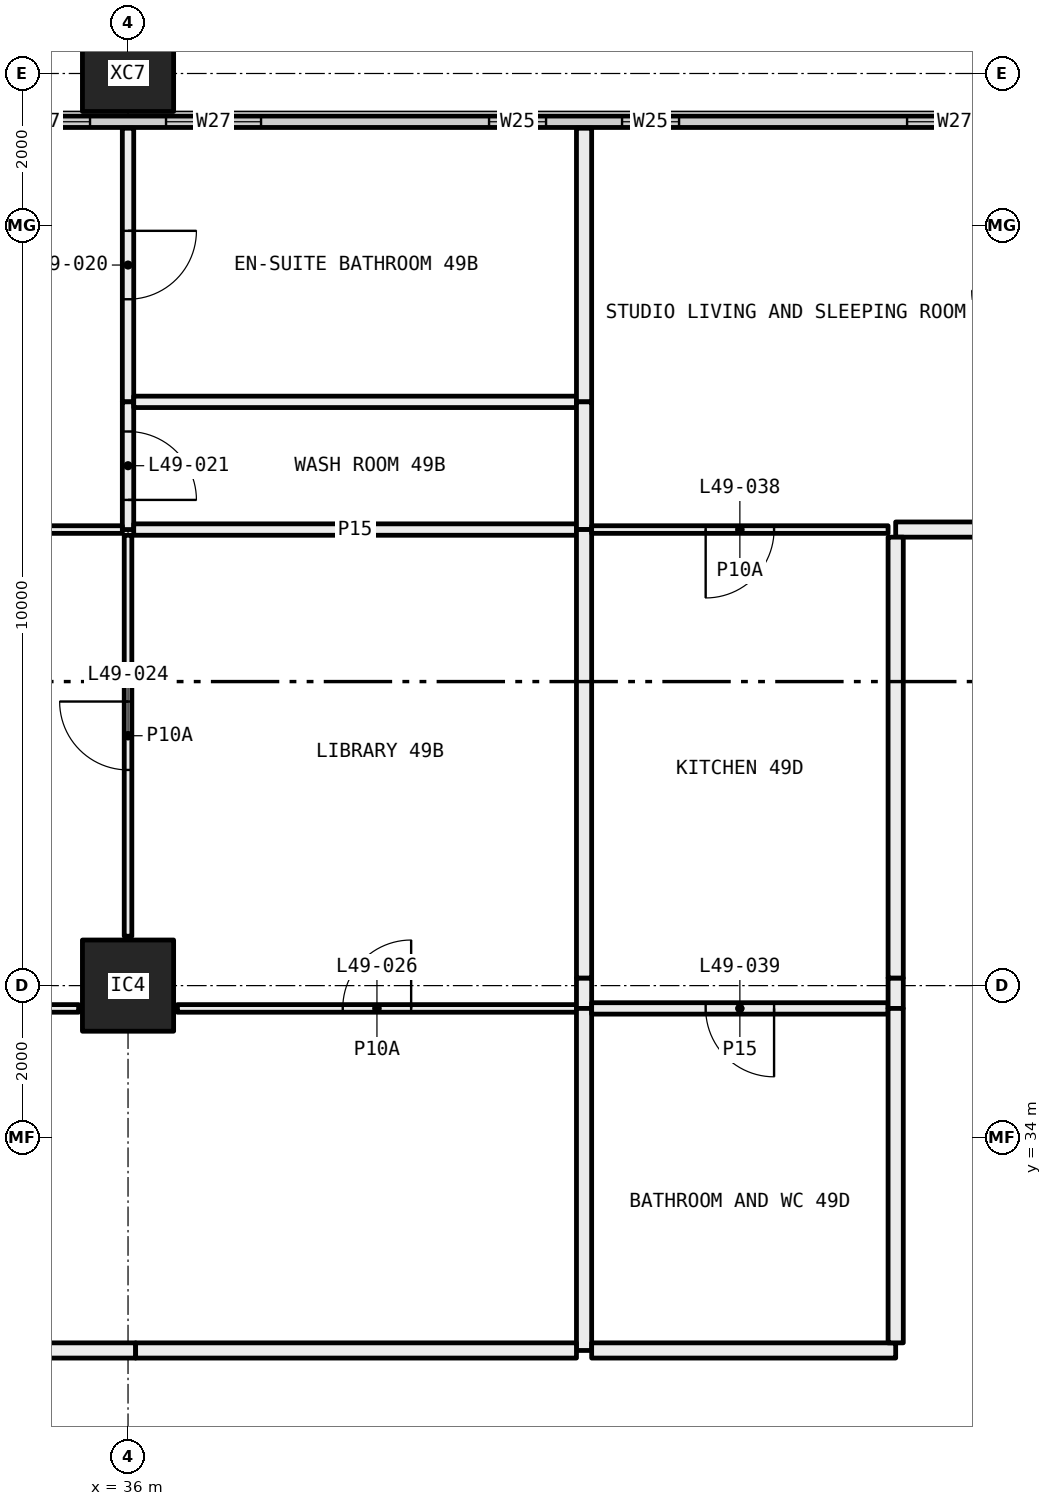
"""IFC4 building model, lengths in metres.
Left out: names, types, materials, properties, quantities, classifications, styles, units other than length and angle.
Written with IfcOpenShell. Run it as: python <this file> out.ifc"""

import sys

from ifc_helpers import new_model, si_unit, direction, frame, frame_2d, origin, origin_2d, place, context, subcontext, project, spatial, rectangle, hollow_rectangle, extrude, element, fill, save


model = new_model("IFC4")
c1 = context("Model", 3, precision=1e-05, world=origin(), true_north=direction((0.0, 1.0)))
c2 = subcontext(c1, "Body", "Model", "MODEL_VIEW")
j1 = project(units=[si_unit("LENGTHUNIT", "METRE"), si_unit("PLANEANGLEUNIT", "RADIAN")], contexts=[c1])
p1 = place(None, origin())
s1 = spatial("IfcSite", under=j1, at=p1, CompositionType="ELEMENT")
p2 = place(p1, origin())
s2 = spatial("IfcBuilding", under=s1, at=p2, CompositionType="ELEMENT")
p3 = place(p2, frame((0.0, 0.0, 185.85)))
s3 = spatial("IfcBuildingStorey", under=s2, at=p3, CompositionType="ELEMENT", Elevation=185.85)
p4 = place(p3, frame((36.0, 36.0, 0.0), z_axis=(0.0, 0.0, 1.0), x_axis=(1.0, 0.0, 0.0)))
e1 = element("IfcColumn", 1, at=p4, inside=s3, PredefinedType="COLUMN", context=c2, shape_type="SweptSolid", body=[
    extrude(hollow_rectangle(XDim=1.2, YDim=1.2, WallThickness=0.05, at=origin_2d()), origin(), (0.0, 0.0, 1.0), 3.05),
])
p5 = place(p3, frame((36.0, 48.0, -0.4), z_axis=(0.0, 0.0, 1.0), x_axis=(1.0, 0.0, 0.0)))
e2 = element("IfcColumn", 2, at=p5, inside=s3, PredefinedType="COLUMN", context=c2, shape_type="SweptSolid", body=[
    extrude(hollow_rectangle(XDim=1.2, YDim=1.0, WallThickness=0.045, at=origin_2d()), origin(), (0.0, 0.0, 1.0), 3.45),
])
p6 = place(p3, frame((6.56, 47.365, 0.0), z_axis=(0.0, 0.0, 1.0), x_axis=(1.0, 0.0, 0.0)))
e3 = element("IfcWall", 3, at=p6, inside=s3, PredefinedType="ELEMENTEDWALL", context=c2, shape_type="SweptSolid", body=[
    extrude(rectangle(XDim=46.88, YDim=0.15, at=frame_2d((23.44, 0.0))), origin(), (0.0, 0.0, 1.0), 3.05),
])
p7 = place(p6, frame((0.44, 0.0, 0.45)))
e4 = element("IfcOpeningElement", 4, at=p7, cuts=e3, PredefinedType="OPENING", context=c2, shape_type="SweptSolid", body=[
    extrude(rectangle(XDim=4.5, YDim=2.55, at=frame_2d((2.25, 1.275))), frame((0.0, 0.085, 0.0), z_axis=(0.0, -1.0, 0.0), x_axis=(1.0, 0.0, 0.0)), (0.0, 0.0, 1.0), 0.17),
])
p8 = place(p6, frame((5.94, 0.0, 0.45)))
e5 = element("IfcOpeningElement", 5, at=p8, cuts=e3, PredefinedType="OPENING", context=c2, shape_type="SweptSolid", body=[
    extrude(rectangle(XDim=1.25, YDim=2.55, at=frame_2d((0.625, 1.275))), frame((0.0, 0.085, 0.0), z_axis=(0.0, -1.0, 0.0), x_axis=(1.0, 0.0, 0.0)), (0.0, 0.0, 1.0), 0.17),
])
p9 = place(p6, frame((10.19, 0.0, 0.45)))
e6 = element("IfcOpeningElement", 6, at=p9, cuts=e3, PredefinedType="OPENING", context=c2, shape_type="SweptSolid", body=[
    extrude(rectangle(XDim=0.75, YDim=2.55, at=frame_2d((0.375, 1.275))), frame((0.0, 0.085, 0.0), z_axis=(0.0, -1.0, 0.0), x_axis=(1.0, 0.0, 0.0)), (0.0, 0.0, 1.0), 0.17),
])
p10 = place(p6, frame((11.94, 0.0, 0.45)))
e7 = element("IfcOpeningElement", 7, at=p10, cuts=e3, PredefinedType="OPENING", context=c2, shape_type="SweptSolid", body=[
    extrude(rectangle(XDim=0.75, YDim=2.55, at=frame_2d((0.375, 1.275))), frame((0.0, 0.085, 0.0), z_axis=(0.0, -1.0, 0.0), x_axis=(1.0, 0.0, 0.0)), (0.0, 0.0, 1.0), 0.17),
])
p11 = place(p6, frame((15.69, 0.0, 0.45)))
e8 = element("IfcOpeningElement", 8, at=p11, cuts=e3, PredefinedType="OPENING", context=c2, shape_type="SweptSolid", body=[
    extrude(rectangle(XDim=1.25, YDim=2.55, at=frame_2d((0.625, 1.275))), frame((0.0, 0.085, 0.0), z_axis=(0.0, -1.0, 0.0), x_axis=(1.0, 0.0, 0.0)), (0.0, 0.0, 1.0), 0.17),
])
p12 = place(p6, frame((17.94, 0.0, 0.45)))
e9 = element("IfcOpeningElement", 9, at=p12, cuts=e3, PredefinedType="OPENING", context=c2, shape_type="SweptSolid", body=[
    extrude(rectangle(XDim=1.25, YDim=2.55, at=frame_2d((0.625, 1.275))), frame((0.0, 0.085, 0.0), z_axis=(0.0, -1.0, 0.0), x_axis=(1.0, 0.0, 0.0)), (0.0, 0.0, 1.0), 0.17),
])
p13 = place(p6, frame((22.19, 0.0, 0.45)))
e10 = element("IfcOpeningElement", 10, at=p13, cuts=e3, PredefinedType="OPENING", context=c2, shape_type="SweptSolid", body=[
    extrude(rectangle(XDim=0.75, YDim=2.55, at=frame_2d((0.375, 1.275))), frame((0.0, 0.085, 0.0), z_axis=(0.0, -1.0, 0.0), x_axis=(1.0, 0.0, 0.0)), (0.0, 0.0, 1.0), 0.17),
])
p14 = place(p6, frame((23.94, 0.0, 0.45)))
e11 = element("IfcOpeningElement", 11, at=p14, cuts=e3, PredefinedType="OPENING", context=c2, shape_type="SweptSolid", body=[
    extrude(rectangle(XDim=0.75, YDim=2.55, at=frame_2d((0.375, 1.275))), frame((0.0, 0.085, 0.0), z_axis=(0.0, -1.0, 0.0), x_axis=(1.0, 0.0, 0.0)), (0.0, 0.0, 1.0), 0.17),
])
p15 = place(p6, frame((27.69, 0.0, 0.45)))
e12 = element("IfcOpeningElement", 12, at=p15, cuts=e3, PredefinedType="OPENING", context=c2, shape_type="SweptSolid", body=[
    extrude(rectangle(XDim=1.25, YDim=2.55, at=frame_2d((0.625, 1.275))), frame((0.0, 0.085, 0.0), z_axis=(0.0, -1.0, 0.0), x_axis=(1.0, 0.0, 0.0)), (0.0, 0.0, 1.0), 0.17),
])
p16 = place(p6, frame((29.94, 0.0, 0.45)))
e13 = element("IfcOpeningElement", 13, at=p16, cuts=e3, PredefinedType="OPENING", context=c2, shape_type="SweptSolid", body=[
    extrude(rectangle(XDim=1.25, YDim=2.55, at=frame_2d((0.625, 1.275))), frame((0.0, 0.085, 0.0), z_axis=(0.0, -1.0, 0.0), x_axis=(1.0, 0.0, 0.0)), (0.0, 0.0, 1.0), 0.17),
])
p17 = place(p6, frame((34.19, 0.0, 0.45)))
e14 = element("IfcOpeningElement", 14, at=p17, cuts=e3, PredefinedType="OPENING", context=c2, shape_type="SweptSolid", body=[
    extrude(rectangle(XDim=0.75, YDim=2.55, at=frame_2d((0.375, 1.275))), frame((0.0, 0.085, 0.0), z_axis=(0.0, -1.0, 0.0), x_axis=(1.0, 0.0, 0.0)), (0.0, 0.0, 1.0), 0.17),
])
p18 = place(p6, frame((35.94, 0.0, 0.45)))
e15 = element("IfcOpeningElement", 15, at=p18, cuts=e3, PredefinedType="OPENING", context=c2, shape_type="SweptSolid", body=[
    extrude(rectangle(XDim=0.75, YDim=2.55, at=frame_2d((0.375, 1.275))), frame((0.0, 0.085, 0.0), z_axis=(0.0, -1.0, 0.0), x_axis=(1.0, 0.0, 0.0)), (0.0, 0.0, 1.0), 0.17),
])
p19 = place(p6, frame((39.69, 0.0, 0.45)))
e16 = element("IfcOpeningElement", 16, at=p19, cuts=e3, PredefinedType="OPENING", context=c2, shape_type="SweptSolid", body=[
    extrude(rectangle(XDim=1.25, YDim=2.55, at=frame_2d((0.625, 1.275))), frame((0.0, 0.085, 0.0), z_axis=(0.0, -1.0, 0.0), x_axis=(1.0, 0.0, 0.0)), (0.0, 0.0, 1.0), 0.17),
])
p20 = place(p6, frame((41.94, 0.0, 0.45)))
e17 = element("IfcOpeningElement", 17, at=p20, cuts=e3, PredefinedType="OPENING", context=c2, shape_type="SweptSolid", body=[
    extrude(rectangle(XDim=4.5, YDim=2.55, at=frame_2d((2.25, 1.275))), frame((0.0, 0.085, 0.0), z_axis=(0.0, -1.0, 0.0), x_axis=(1.0, 0.0, 0.0)), (0.0, 0.0, 1.0), 0.17),
])
p21 = place(p3, frame((36.0, 43.68, 0.0), z_axis=(0.0, 0.0, 1.0), x_axis=(0.0, 1.0, 0.0)))
e18 = element("IfcWall", 18, at=p21, inside=s3, PredefinedType="PARTITIONING", context=c2, shape_type="SweptSolid", body=[
    extrude(rectangle(XDim=3.6, YDim=0.15, at=frame_2d((1.8, 0.0))), origin(), (0.0, 0.0, 1.0), 2.45),
])
p22 = place(p21, frame((1.35, 0.0, 0.0)))
e19 = element("IfcOpeningElement", 19, at=p22, cuts=e18, PredefinedType="OPENING", context=c2, shape_type="SweptSolid", body=[
    extrude(rectangle(XDim=0.9, YDim=2.1, at=frame_2d((0.45, 1.05))), frame((0.0, 0.085, 0.0), z_axis=(0.0, -1.0, 0.0), x_axis=(1.0, 0.0, 0.0)), (0.0, 0.0, 1.0), 0.17),
])
p23 = place(p3, frame((36.0, 42.0, 0.0), z_axis=(0.0, 0.0, 1.0), x_axis=(0.0, 1.0, 0.0)))
e20 = element("IfcWall", 20, at=p23, inside=s3, PredefinedType="PARTITIONING", context=c2, shape_type="SweptSolid", body=[
    extrude(rectangle(XDim=1.68, YDim=0.15, at=frame_2d((0.84, 0.0))), origin(), (0.0, 0.0, 1.0), 2.45),
])
p24 = place(p23, frame((0.39, 0.0, 0.0)))
e21 = element("IfcOpeningElement", 21, at=p24, cuts=e20, PredefinedType="OPENING", context=c2, shape_type="SweptSolid", body=[
    extrude(rectangle(XDim=0.9, YDim=2.1, at=frame_2d((0.45, 1.05))), frame((0.0, 0.085, 0.0), z_axis=(0.0, -1.0, 0.0), x_axis=(1.0, 0.0, 0.0)), (0.0, 0.0, 1.0), 0.17),
])
p25 = place(p3, frame((31.5, 42.0, 0.0), z_axis=(0.0, 0.0, 1.0), x_axis=(1.0, 0.0, 0.0)))
e22 = element("IfcWall", 22, at=p25, inside=s3, PredefinedType="PARTITIONING", context=c2, shape_type="SweptSolid", body=[
    extrude(rectangle(XDim=4.425, YDim=0.1, at=frame_2d((2.212, 0.0))), origin(), (0.0, 0.0, 1.0), 2.45),
])
p26 = place(p3, frame((36.075, 43.68, 0.0), z_axis=(0.0, 0.0, 1.0), x_axis=(1.0, 0.0, 0.0)))
e23 = element("IfcWall", 23, at=p26, inside=s3, PredefinedType="PARTITIONING", context=c2, shape_type="SweptSolid", body=[
    extrude(rectangle(XDim=5.825, YDim=0.15, at=frame_2d((2.913, 0.0))), origin(), (0.0, 0.0, 1.0), 2.45),
])
p27 = place(p3, frame((42.0, 43.68, 0.0), z_axis=(0.0, 0.0, 1.0), x_axis=(0.0, 1.0, 0.0)))
e24 = element("IfcWall", 24, at=p27, inside=s3, PredefinedType="PARTITIONING", context=c2, shape_type="SweptSolid", body=[
    extrude(rectangle(XDim=3.6, YDim=0.2, at=frame_2d((1.8, 0.0))), origin(), (0.0, 0.0, 1.0), 3.05),
])
p28 = place(p3, frame((36.075, 42.0, 0.0), z_axis=(0.0, 0.0, 1.0), x_axis=(1.0, 0.0, 0.0)))
e25 = element("IfcWall", 25, at=p28, inside=s3, PredefinedType="PARTITIONING", context=c2, shape_type="SweptSolid", body=[
    extrude(rectangle(XDim=5.825, YDim=0.15, at=frame_2d((2.913, 0.0))), origin(), (0.0, 0.0, 1.0), 2.45),
])
p29 = place(p3, frame((42.0, 42.0, 0.0), z_axis=(0.0, 0.0, 1.0), x_axis=(0.0, 1.0, 0.0)))
e26 = element("IfcWall", 26, at=p29, inside=s3, PredefinedType="PARTITIONING", context=c2, shape_type="SweptSolid", body=[
    extrude(rectangle(XDim=1.68, YDim=0.2, at=frame_2d((0.84, 0.0))), origin(), (0.0, 0.0, 1.0), 3.05),
])
p30 = place(p3, frame((36.0, 36.65, 0.0), z_axis=(0.0, 0.0, 1.0), x_axis=(0.0, 1.0, 0.0)))
e27 = element("IfcWall", 27, at=p30, inside=s3, PredefinedType="PARTITIONING", context=c2, shape_type="SweptSolid", body=[
    extrude(rectangle(XDim=5.275, YDim=0.1, at=frame_2d((2.638, 0.0))), origin(), (0.0, 0.0, 1.0), 2.45),
])
p31 = place(p30, frame((2.188, 0.0, 0.0)))
e28 = element("IfcOpeningElement", 28, at=p31, cuts=e27, PredefinedType="OPENING", context=c2, shape_type="SweptSolid", body=[
    extrude(rectangle(XDim=0.9, YDim=2.1, at=frame_2d((0.45, 1.05))), frame((0.0, 0.06, 0.0), z_axis=(0.0, -1.0, 0.0), x_axis=(1.0, 0.0, 0.0)), (0.0, 0.0, 1.0), 0.12),
])
p32 = place(p3, frame((31.55, 35.7, 0.0), z_axis=(0.0, 0.0, 1.0), x_axis=(1.0, 0.0, 0.0)))
e29 = element("IfcWall", 29, at=p32, inside=s3, PredefinedType="PARTITIONING", context=c2, shape_type="SweptSolid", body=[
    extrude(rectangle(XDim=3.8, YDim=0.1, at=frame_2d((1.9, 0.0))), origin(), (0.0, 0.0, 1.0), 3.05),
])
p33 = place(p3, frame((36.65, 35.7, 0.0), z_axis=(0.0, 0.0, 1.0), x_axis=(1.0, 0.0, 0.0)))
e30 = element("IfcWall", 30, at=p33, inside=s3, PredefinedType="PARTITIONING", context=c2, shape_type="SweptSolid", body=[
    extrude(rectangle(XDim=5.25, YDim=0.1, at=frame_2d((2.625, 0.0))), origin(), (0.0, 0.0, 1.0), 3.05),
])
p34 = place(p33, frame((2.175, 0.0, 0.0)))
e31 = element("IfcOpeningElement", 31, at=p34, cuts=e30, PredefinedType="OPENING", context=c2, shape_type="SweptSolid", body=[
    extrude(rectangle(XDim=0.9, YDim=2.1, at=frame_2d((0.45, 1.05))), frame((0.0, 0.06, 0.0), z_axis=(0.0, -1.0, 0.0), x_axis=(1.0, 0.0, 0.0)), (0.0, 0.0, 1.0), 0.12),
])
p35 = place(p3, frame((42.0, 35.7, 0.0), z_axis=(0.0, 0.0, 1.0), x_axis=(0.0, 1.0, 0.0)))
e32 = element("IfcWall", 32, at=p35, inside=s3, PredefinedType="PARTITIONING", context=c2, shape_type="SweptSolid", body=[
    extrude(rectangle(XDim=0.4, YDim=0.2, at=frame_2d((0.2, 0.0))), origin(), (0.0, 0.0, 1.0), 2.45),
])
p36 = place(p3, frame((42.0, 36.1, 0.0), z_axis=(0.0, 0.0, 1.0), x_axis=(0.0, 1.0, 0.0)))
e33 = element("IfcWall", 33, at=p36, inside=s3, PredefinedType="PARTITIONING", context=c2, shape_type="SweptSolid", body=[
    extrude(rectangle(XDim=5.9, YDim=0.2, at=frame_2d((2.95, 0.0))), origin(), (0.0, 0.0, 1.0), 3.05),
])
p37 = place(p3, frame((42.0, 31.2, 0.0), z_axis=(0.0, 0.0, 1.0), x_axis=(0.0, 1.0, 0.0)))
e34 = element("IfcWall", 34, at=p37, inside=s3, PredefinedType="PARTITIONING", context=c2, shape_type="SweptSolid", body=[
    extrude(rectangle(XDim=4.5, YDim=0.2, at=frame_2d((2.25, 0.0))), origin(), (0.0, 0.0, 1.0), 3.05),
])
p38 = place(p3, frame((28.5, 31.2, 0.0), z_axis=(0.0, 0.0, 1.0), x_axis=(1.0, 0.0, 0.0)))
e35 = element("IfcWall", 35, at=p38, inside=s3, PredefinedType="PARTITIONING", context=c2, shape_type="SweptSolid", body=[
    extrude(rectangle(XDim=7.6, YDim=0.2, at=frame_2d((3.8, 0.0))), origin(), (0.0, 0.0, 1.0), 2.45),
])
p39 = place(p3, frame((36.1, 31.2, 0.0), z_axis=(0.0, 0.0, 1.0), x_axis=(1.0, 0.0, 0.0)))
e36 = element("IfcWall", 36, at=p39, inside=s3, PredefinedType="PARTITIONING", context=c2, shape_type="SweptSolid", body=[
    extrude(rectangle(XDim=5.8, YDim=0.2, at=frame_2d((2.9, 0.0))), origin(), (0.0, 0.0, 1.0), 3.05),
])
p40 = place(p3, frame((42.1, 42.0, 0.0), z_axis=(0.0, 0.0, 1.0), x_axis=(1.0, 0.0, 0.0)))
e37 = element("IfcWall", 37, at=p40, inside=s3, PredefinedType="PARTITIONING", context=c2, shape_type="SweptSolid", body=[
    extrude(rectangle(XDim=3.9, YDim=0.1, at=frame_2d((1.95, 0.0))), origin(), (0.0, 0.0, 1.0), 3.05),
])
p41 = place(p40, frame((1.5, 0.0, 0.0)))
e38 = element("IfcOpeningElement", 38, at=p41, cuts=e37, PredefinedType="OPENING", context=c2, shape_type="SweptSolid", body=[
    extrude(rectangle(XDim=0.9, YDim=2.1, at=frame_2d((0.45, 1.05))), frame((0.0, 0.06, 0.0), z_axis=(0.0, -1.0, 0.0), x_axis=(1.0, 0.0, 0.0)), (0.0, 0.0, 1.0), 0.12),
])
p42 = place(p3, frame((46.1, 42.0, 0.0), z_axis=(0.0, 0.0, 1.0), x_axis=(1.0, 0.0, 0.0)))
e39 = element("IfcWall", 39, at=p42, inside=s3, PredefinedType="PARTITIONING", context=c2, shape_type="SweptSolid", body=[
    extrude(rectangle(XDim=1.9, YDim=0.2, at=frame_2d((0.95, 0.0))), origin(), (0.0, 0.0, 1.0), 3.05),
])
p43 = place(p3, frame((42.1, 35.7, 0.0), z_axis=(0.0, 0.0, 1.0), x_axis=(1.0, 0.0, 0.0)))
e40 = element("IfcWall", 40, at=p43, inside=s3, PredefinedType="PARTITIONING", context=c2, shape_type="SweptSolid", body=[
    extrude(rectangle(XDim=3.9, YDim=0.15, at=frame_2d((1.95, 0.0))), origin(), (0.0, 0.0, 1.0), 3.05),
])
p44 = place(p43, frame((1.5, 0.0, 0.0)))
e41 = element("IfcOpeningElement", 41, at=p44, cuts=e40, PredefinedType="OPENING", context=c2, shape_type="SweptSolid", body=[
    extrude(rectangle(XDim=0.9, YDim=2.1, at=frame_2d((0.45, 1.05))), frame((0.0, 0.085, 0.0), z_axis=(0.0, -1.0, 0.0), x_axis=(1.0, 0.0, 0.0)), (0.0, 0.0, 1.0), 0.17),
])
p45 = place(p3, frame((46.1, 35.7, 0.0), z_axis=(0.0, 0.0, 1.0), x_axis=(0.0, 1.0, 0.0)))
e42 = element("IfcWall", 42, at=p45, inside=s3, PredefinedType="PARTITIONING", context=c2, shape_type="SweptSolid", body=[
    extrude(rectangle(XDim=0.4, YDim=0.2, at=frame_2d((0.2, 0.0))), origin(), (0.0, 0.0, 1.0), 2.45),
])
p46 = place(p3, frame((46.1, 36.1, 0.0), z_axis=(0.0, 0.0, 1.0), x_axis=(0.0, 1.0, 0.0)))
e43 = element("IfcWall", 43, at=p46, inside=s3, PredefinedType="PARTITIONING", context=c2, shape_type="SweptSolid", body=[
    extrude(rectangle(XDim=5.8, YDim=0.2, at=frame_2d((2.9, 0.0))), origin(), (0.0, 0.0, 1.0), 3.05),
])
p47 = place(p3, frame((42.1, 31.2, 0.0), z_axis=(0.0, 0.0, 1.0), x_axis=(1.0, 0.0, 0.0)))
e44 = element("IfcWall", 44, at=p47, inside=s3, PredefinedType="PARTITIONING", context=c2, shape_type="SweptSolid", body=[
    extrude(rectangle(XDim=4.0, YDim=0.2, at=frame_2d((2.0, 0.0))), origin(), (0.0, 0.0, 1.0), 3.05),
])
p48 = place(p3, frame((46.1, 31.3, 0.0), z_axis=(0.0, 0.0, 1.0), x_axis=(0.0, 1.0, 0.0)))
e45 = element("IfcWall", 45, at=p48, inside=s3, PredefinedType="PARTITIONING", context=c2, shape_type="SweptSolid", body=[
    extrude(rectangle(XDim=4.4, YDim=0.2, at=frame_2d((2.2, 0.0))), origin(), (0.0, 0.0, 1.0), 3.05),
])
p49 = place(p15, origin())
e46 = element("IfcWindow", 46, at=p49, inside=s3, PartitioningType="SINGLE_PANEL", PredefinedType="WINDOW", context=c2, shape_type="SweptSolid", body=[
    extrude(rectangle(XDim=1.25, YDim=2.55, at=frame_2d((0.625, 1.275))), frame((0.0, 0.03, 0.0), z_axis=(0.0, -1.0, 0.0), x_axis=(1.0, 0.0, 0.0)), (0.0, 0.0, 1.0), 0.06),
])
fill(e12, e46)
p50 = place(p16, origin())
e47 = element("IfcWindow", 47, at=p50, inside=s3, PartitioningType="SINGLE_PANEL", PredefinedType="WINDOW", context=c2, shape_type="SweptSolid", body=[
    extrude(rectangle(XDim=1.25, YDim=2.55, at=frame_2d((0.625, 1.275))), frame((0.0, 0.03, 0.0), z_axis=(0.0, -1.0, 0.0), x_axis=(1.0, 0.0, 0.0)), (0.0, 0.0, 1.0), 0.06),
])
fill(e13, e47)
p51 = place(p17, origin())
e48 = element("IfcWindow", 48, at=p51, inside=s3, PartitioningType="SINGLE_PANEL", PredefinedType="WINDOW", context=c2, shape_type="SweptSolid", body=[
    extrude(rectangle(XDim=0.75, YDim=2.55, at=frame_2d((0.375, 1.275))), frame((0.0, 0.03, 0.0), z_axis=(0.0, -1.0, 0.0), x_axis=(1.0, 0.0, 0.0)), (0.0, 0.0, 1.0), 0.06),
])
fill(e14, e48)
p52 = place(p18, origin())
e49 = element("IfcWindow", 49, at=p52, inside=s3, PartitioningType="SINGLE_PANEL", PredefinedType="WINDOW", context=c2, shape_type="SweptSolid", body=[
    extrude(rectangle(XDim=0.75, YDim=2.55, at=frame_2d((0.375, 1.275))), frame((0.0, 0.03, 0.0), z_axis=(0.0, -1.0, 0.0), x_axis=(1.0, 0.0, 0.0)), (0.0, 0.0, 1.0), 0.06),
])
fill(e15, e49)
p53 = place(p19, origin())
e50 = element("IfcWindow", 50, at=p53, inside=s3, PartitioningType="SINGLE_PANEL", PredefinedType="WINDOW", context=c2, shape_type="SweptSolid", body=[
    extrude(rectangle(XDim=1.25, YDim=2.55, at=frame_2d((0.625, 1.275))), frame((0.0, 0.03, 0.0), z_axis=(0.0, -1.0, 0.0), x_axis=(1.0, 0.0, 0.0)), (0.0, 0.0, 1.0), 0.06),
])
fill(e16, e50)
p54 = place(p22, frame((0.9, 0.0, 0.0), x_axis=(-1.0, 0.0, 0.0)))
e51 = element("IfcDoor", 51, at=p54, inside=s3, OperationType="SINGLE_SWING_RIGHT", PredefinedType="DOOR", context=c2, shape_type="SweptSolid", body=[
    extrude(rectangle(XDim=0.9, YDim=2.1, at=frame_2d((0.45, 1.05))), frame((0.0, 0.025, 0.0), z_axis=(0.0, -1.0, 0.0), x_axis=(1.0, 0.0, 0.0)), (0.0, 0.0, 1.0), 0.05),
])
fill(e19, e51)
p55 = place(p24, frame((0.9, 0.0, 0.0), x_axis=(-1.0, 0.0, 0.0)))
e52 = element("IfcDoor", 52, at=p55, inside=s3, OperationType="SINGLE_SWING_LEFT", PredefinedType="DOOR", context=c2, shape_type="SweptSolid", body=[
    extrude(rectangle(XDim=0.9, YDim=2.1, at=frame_2d((0.45, 1.05))), frame((0.0, 0.025, 0.0), z_axis=(0.0, -1.0, 0.0), x_axis=(1.0, 0.0, 0.0)), (0.0, 0.0, 1.0), 0.05),
])
fill(e21, e52)
p56 = place(p31, origin())
e53 = element("IfcDoor", 53, at=p56, inside=s3, OperationType="SINGLE_SWING_LEFT", PredefinedType="DOOR", context=c2, shape_type="SweptSolid", body=[
    extrude(rectangle(XDim=0.9, YDim=2.1, at=frame_2d((0.45, 1.05))), frame((0.0, 0.025, 0.0), z_axis=(0.0, -1.0, 0.0), x_axis=(1.0, 0.0, 0.0)), (0.0, 0.0, 1.0), 0.05),
])
fill(e28, e53)
p57 = place(p34, origin())
e54 = element("IfcDoor", 54, at=p57, inside=s3, OperationType="SINGLE_SWING_LEFT", PredefinedType="DOOR", context=c2, shape_type="SweptSolid", body=[
    extrude(rectangle(XDim=0.9, YDim=2.1, at=frame_2d((0.45, 1.05))), frame((0.0, 0.025, 0.0), z_axis=(0.0, -1.0, 0.0), x_axis=(1.0, 0.0, 0.0)), (0.0, 0.0, 1.0), 0.05),
])
fill(e31, e54)
p58 = place(p41, frame((0.9, 0.0, 0.0), x_axis=(-1.0, 0.0, 0.0)))
e55 = element("IfcDoor", 55, at=p58, inside=s3, OperationType="SINGLE_SWING_LEFT", PredefinedType="DOOR", context=c2, shape_type="SweptSolid", body=[
    extrude(rectangle(XDim=0.9, YDim=2.1, at=frame_2d((0.45, 1.05))), frame((0.0, 0.025, 0.0), z_axis=(0.0, -1.0, 0.0), x_axis=(1.0, 0.0, 0.0)), (0.0, 0.0, 1.0), 0.05),
])
fill(e38, e55)
p59 = place(p44, frame((0.9, 0.0, 0.0), x_axis=(-1.0, 0.0, 0.0)))
e56 = element("IfcDoor", 56, at=p59, inside=s3, OperationType="SINGLE_SWING_RIGHT", PredefinedType="DOOR", context=c2, shape_type="SweptSolid", body=[
    extrude(rectangle(XDim=0.9, YDim=2.1, at=frame_2d((0.45, 1.05))), frame((0.0, 0.025, 0.0), z_axis=(0.0, -1.0, 0.0), x_axis=(1.0, 0.0, 0.0)), (0.0, 0.0, 1.0), 0.05),
])
fill(e41, e56)
save(model, sys.argv[1])
